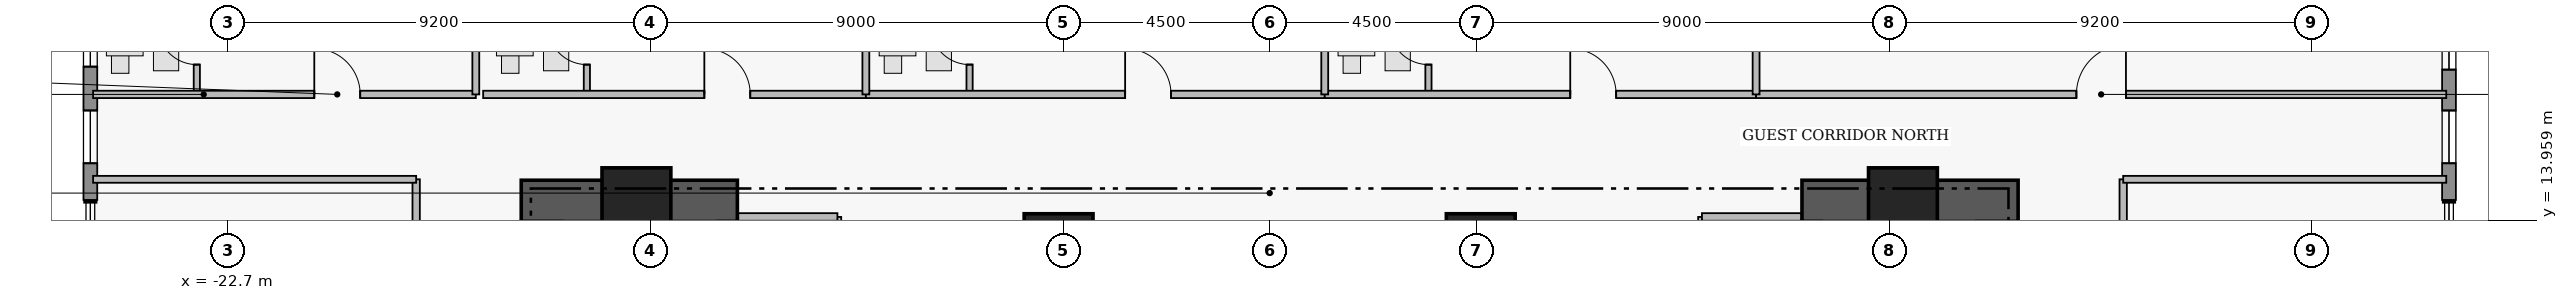
"""IFC4 building model, lengths in metres.
Left out: names, types, materials, properties, quantities, classifications, styles, units other than length and angle.
Written with IfcOpenShell. Run it as: python <this file> out.ifc"""

import sys

from ifc_helpers import new_model, si_unit, direction, frame, frame_2d, origin, origin_2d, place, context, subcontext, project, spatial, rectangle, extrude, element, fill, save


model = new_model("IFC4")
c1 = context("Model", 3, precision=1e-05, world=origin(), true_north=direction((0.0, 1.0)))
c2 = subcontext(c1, "Body", "Model", "MODEL_VIEW")
j1 = project(units=[si_unit("LENGTHUNIT", "METRE"), si_unit("PLANEANGLEUNIT", "RADIAN")], contexts=[c1])
p1 = place(None, origin())
s1 = spatial("IfcSite", under=j1, at=p1, CompositionType="ELEMENT")
p2 = place(p1, origin())
s2 = spatial("IfcBuilding", under=s1, at=p2, CompositionType="ELEMENT")
p3 = place(p2, frame((0.0, 0.0, 38.55)))
s3 = spatial("IfcBuildingStorey", under=s2, at=p3, CompositionType="ELEMENT", Elevation=38.55)
for number, where, z_axis, x_axis in (
    (1, (-16.31, 14.38, 0.0), (0.0, 0.0, 1.0), (1.0, 0.0, 0.0)),
    (2, (11.6, 14.38, 0.0), (0.0, 0.0, 1.0), (1.0, 0.0, 0.0)),
):
    element("IfcWall", number, at=place(p3, frame(where, z_axis=z_axis, x_axis=x_axis)), inside=s3, PredefinedType="SHEAR", context=c2, shape_type="SweptSolid", body=[
        extrude(rectangle(XDim=4.71, YDim=0.9, at=frame_2d((2.355, 0.0))), origin(), (0.0, 0.0, 1.0), 3.46),
    ])
for number, where, z_axis, x_axis in (
    (3, (-13.8, 14.35, 0.0), (0.0, 0.0, 1.0), (1.0, 0.0, 0.0)),
    (4, (-4.6, 13.35, 0.0), (0.0, 0.0, 1.0), (1.0, 0.0, 0.0)),
    (5, (4.6, 13.35, 0.0), (0.0, 0.0, 1.0), (1.0, 0.0, 0.0)),
    (6, (13.8, 14.35, 0.0), (0.0, 0.0, 1.0), (1.0, 0.0, 0.0)),
):
    element("IfcColumn", number, at=place(p3, frame(where, z_axis=z_axis, x_axis=x_axis)), inside=s3, PredefinedType="COLUMN", context=c2, shape_type="SweptSolid", body=[
        extrude(rectangle(XDim=1.5, YDim=1.5, at=origin_2d()), origin(), (0.0, 0.0, 1.0), 3.65),
    ])
p4 = place(p3, frame((-25.7, 14.4, 0.0), z_axis=(0.0, 0.0, 1.0), x_axis=(0.0, 1.0, 0.0)))
e7 = element("IfcWall", 7, at=p4, inside=s3, PredefinedType="STANDARD", context=c2, shape_type="SweptSolid", body=[
    extrude(rectangle(XDim=5.1, YDim=0.3, at=frame_2d((2.55, 0.0))), origin(), (0.0, 0.0, 1.0), 3.43),
])
p5 = place(p4, frame((0.8, 0.0, 0.95)))
e8 = element("IfcOpeningElement", 8, at=p5, cuts=e7, PredefinedType="OPENING", context=c2, shape_type="SweptSolid", body=[
    extrude(rectangle(XDim=1.15, YDim=1.55, at=frame_2d((0.575, 0.775))), frame((0.0, 0.16, 0.0), z_axis=(0.0, -1.0, 0.0), x_axis=(1.0, 0.0, 0.0)), (0.0, 0.0, 1.0), 0.32),
])
p6 = place(p4, frame((2.905, 0.0, 0.95)))
e9 = element("IfcOpeningElement", 9, at=p6, cuts=e7, PredefinedType="OPENING", context=c2, shape_type="SweptSolid", body=[
    extrude(rectangle(XDim=1.15, YDim=1.55, at=frame_2d((0.575, 0.775))), frame((0.0, 0.16, 0.0), z_axis=(0.0, -1.0, 0.0), x_axis=(1.0, 0.0, 0.0)), (0.0, 0.0, 1.0), 0.32),
])
p7 = place(p3, frame((25.7, 19.5, 0.0), z_axis=(0.0, 0.0, 1.0), x_axis=(0.0, -1.0, 0.0)))
e10 = element("IfcWall", 10, at=p7, inside=s3, PredefinedType="STANDARD", context=c2, shape_type="SweptSolid", body=[
    extrude(rectangle(XDim=5.1, YDim=0.3, at=frame_2d((2.55, 0.0))), origin(), (0.0, 0.0, 1.0), 3.43),
])
p8 = place(p7, frame((0.66, 0.0, 0.85)))
e11 = element("IfcOpeningElement", 11, at=p8, cuts=e10, PredefinedType="OPENING", context=c2, shape_type="SweptSolid", body=[
    extrude(rectangle(XDim=1.6, YDim=1.8, at=frame_2d((0.8, 0.9))), frame((0.0, 0.16, 0.0), z_axis=(0.0, -1.0, 0.0), x_axis=(1.0, 0.0, 0.0)), (0.0, 0.0, 1.0), 0.32),
])
p9 = place(p7, frame((3.15, 0.0, 0.95)))
e12 = element("IfcOpeningElement", 12, at=p9, cuts=e10, PredefinedType="OPENING", context=c2, shape_type="SweptSolid", body=[
    extrude(rectangle(XDim=1.15, YDim=1.55, at=frame_2d((0.575, 0.775))), frame((0.0, 0.16, 0.0), z_axis=(0.0, -1.0, 0.0), x_axis=(1.0, 0.0, 0.0)), (0.0, 0.0, 1.0), 0.32),
])
p10 = place(p3, frame((-23.38, 16.7, 0.0), z_axis=(0.0, 0.0, 1.0), x_axis=(0.0, 1.0, 0.0)))
e13 = element("IfcWall", 13, at=p10, inside=s3, PredefinedType="PLUMBINGWALL", context=c2, shape_type="SweptSolid", body=[
    extrude(rectangle(XDim=2.36, YDim=0.135, at=frame_2d((1.18, 0.0))), origin(), (0.0, 0.0, 1.0), 3.43),
])
p11 = place(p10, frame((0.65, 0.0, 0.0)))
e14 = element("IfcOpeningElement", 14, at=p11, cuts=e13, PredefinedType="OPENING", context=c2, shape_type="SweptSolid", body=[
    extrude(rectangle(XDim=0.85, YDim=2.1, at=frame_2d((0.425, 1.05))), frame((0.0, 0.077, 0.0), z_axis=(0.0, -1.0, 0.0), x_axis=(1.0, 0.0, 0.0)), (0.0, 0.0, 1.0), 0.155),
])
p12 = place(p3, frame((-25.64, 16.7, 0.0), z_axis=(0.0, 0.0, 1.0), x_axis=(1.0, 0.0, 0.0)))
e15 = element("IfcWall", 15, at=p12, inside=s3, PredefinedType="PARTITIONING", context=c2, shape_type="SweptSolid", body=[
    extrude(rectangle(XDim=8.34, YDim=0.16, at=frame_2d((4.17, 0.0))), origin(), (0.0, 0.0, 1.0), 3.43),
])
p13 = place(p12, frame((4.82, 0.0, 0.0)))
e16 = element("IfcOpeningElement", 16, at=p13, cuts=e15, PredefinedType="OPENING", context=c2, shape_type="SweptSolid", body=[
    extrude(rectangle(XDim=1.0, YDim=2.15, at=frame_2d((0.5, 1.075))), frame((0.0, 0.09, 0.0), z_axis=(0.0, -1.0, 0.0), x_axis=(1.0, 0.0, 0.0)), (0.0, 0.0, 1.0), 0.18),
])
p14 = place(p3, frame((-14.88, 16.7, 0.0), z_axis=(0.0, 0.0, 1.0), x_axis=(0.0, 1.0, 0.0)))
e17 = element("IfcWall", 17, at=p14, inside=s3, PredefinedType="PLUMBINGWALL", context=c2, shape_type="SweptSolid", body=[
    extrude(rectangle(XDim=2.36, YDim=0.135, at=frame_2d((1.18, 0.0))), origin(), (0.0, 0.0, 1.0), 3.43),
])
p15 = place(p14, frame((0.65, 0.0, 0.0)))
e18 = element("IfcOpeningElement", 18, at=p15, cuts=e17, PredefinedType="OPENING", context=c2, shape_type="SweptSolid", body=[
    extrude(rectangle(XDim=0.85, YDim=2.1, at=frame_2d((0.425, 1.05))), frame((0.0, 0.077, 0.0), z_axis=(0.0, -1.0, 0.0), x_axis=(1.0, 0.0, 0.0)), (0.0, 0.0, 1.0), 0.155),
])
p16 = place(p3, frame((-17.14, 16.7, 0.0), z_axis=(0.0, 0.0, 1.0), x_axis=(1.0, 0.0, 0.0)))
e19 = element("IfcWall", 19, at=p16, inside=s3, PredefinedType="PARTITIONING", context=c2, shape_type="SweptSolid", body=[
    extrude(rectangle(XDim=8.34, YDim=0.16, at=frame_2d((4.17, 0.0))), origin(), (0.0, 0.0, 1.0), 2.973),
])
p17 = place(p16, frame((4.82, 0.0, 0.0)))
e20 = element("IfcOpeningElement", 20, at=p17, cuts=e19, PredefinedType="OPENING", context=c2, shape_type="SweptSolid", body=[
    extrude(rectangle(XDim=1.0, YDim=2.15, at=frame_2d((0.5, 1.075))), frame((0.0, 0.09, 0.0), z_axis=(0.0, -1.0, 0.0), x_axis=(1.0, 0.0, 0.0)), (0.0, 0.0, 1.0), 0.18),
])
p18 = place(p3, frame((-6.54, 16.7, 0.0), z_axis=(0.0, 0.0, 1.0), x_axis=(0.0, 1.0, 0.0)))
e21 = element("IfcWall", 21, at=p18, inside=s3, PredefinedType="PLUMBINGWALL", context=c2, shape_type="SweptSolid", body=[
    extrude(rectangle(XDim=2.36, YDim=0.135, at=frame_2d((1.18, 0.0))), origin(), (0.0, 0.0, 1.0), 3.43),
])
p19 = place(p18, frame((0.65, 0.0, 0.0)))
e22 = element("IfcOpeningElement", 22, at=p19, cuts=e21, PredefinedType="OPENING", context=c2, shape_type="SweptSolid", body=[
    extrude(rectangle(XDim=0.85, YDim=2.1, at=frame_2d((0.425, 1.05))), frame((0.0, 0.077, 0.0), z_axis=(0.0, -1.0, 0.0), x_axis=(1.0, 0.0, 0.0)), (0.0, 0.0, 1.0), 0.155),
])
p20 = place(p3, frame((-8.8, 16.7, 0.0), z_axis=(0.0, 0.0, 1.0), x_axis=(1.0, 0.0, 0.0)))
e23 = element("IfcWall", 23, at=p20, inside=s3, PredefinedType="PARTITIONING", context=c2, shape_type="SweptSolid", body=[
    extrude(rectangle(XDim=10.0, YDim=0.16, at=frame_2d((5.0, 0.0))), origin(), (0.0, 0.0, 1.0), 2.973),
])
p21 = place(p20, frame((5.65, 0.0, 0.0)))
e24 = element("IfcOpeningElement", 24, at=p21, cuts=e23, PredefinedType="OPENING", context=c2, shape_type="SweptSolid", body=[
    extrude(rectangle(XDim=1.0, YDim=2.15, at=frame_2d((0.5, 1.075))), frame((0.0, 0.09, 0.0), z_axis=(0.0, -1.0, 0.0), x_axis=(1.0, 0.0, 0.0)), (0.0, 0.0, 1.0), 0.18),
])
p22 = place(p3, frame((3.46, 16.7, 0.0), z_axis=(0.0, 0.0, 1.0), x_axis=(0.0, 1.0, 0.0)))
e25 = element("IfcWall", 25, at=p22, inside=s3, PredefinedType="PLUMBINGWALL", context=c2, shape_type="SweptSolid", body=[
    extrude(rectangle(XDim=2.36, YDim=0.135, at=frame_2d((1.18, 0.0))), origin(), (0.0, 0.0, 1.0), 3.43),
])
p23 = place(p22, frame((0.65, 0.0, 0.0)))
e26 = element("IfcOpeningElement", 26, at=p23, cuts=e25, PredefinedType="OPENING", context=c2, shape_type="SweptSolid", body=[
    extrude(rectangle(XDim=0.85, YDim=2.1, at=frame_2d((0.425, 1.05))), frame((0.0, 0.077, 0.0), z_axis=(0.0, -1.0, 0.0), x_axis=(1.0, 0.0, 0.0)), (0.0, 0.0, 1.0), 0.155),
])
p24 = place(p3, frame((1.2, 16.7, 0.0), z_axis=(0.0, 0.0, 1.0), x_axis=(1.0, 0.0, 0.0)))
e27 = element("IfcWall", 27, at=p24, inside=s3, PredefinedType="PARTITIONING", context=c2, shape_type="SweptSolid", body=[
    extrude(rectangle(XDim=9.4, YDim=0.16, at=frame_2d((4.7, 0.0))), origin(), (0.0, 0.0, 1.0), 2.973),
])
p25 = place(p24, frame((5.35, 0.0, 0.0)))
e28 = element("IfcOpeningElement", 28, at=p25, cuts=e27, PredefinedType="OPENING", context=c2, shape_type="SweptSolid", body=[
    extrude(rectangle(XDim=1.0, YDim=2.15, at=frame_2d((0.5, 1.075))), frame((0.0, 0.09, 0.0), z_axis=(0.0, -1.0, 0.0), x_axis=(1.0, 0.0, 0.0)), (0.0, 0.0, 1.0), 0.18),
])
p26 = place(p3, frame((10.6, 16.7, 0.0), z_axis=(0.0, 0.0, 1.0), x_axis=(1.0, 0.0, 0.0)))
e29 = element("IfcWall", 29, at=p26, inside=s3, PredefinedType="PARTITIONING", context=c2, shape_type="SweptSolid", body=[
    extrude(rectangle(XDim=15.04, YDim=0.16, at=frame_2d((7.52, 0.0))), origin(), (0.0, 0.0, 1.0), 2.973),
])
p27 = place(p26, frame((6.98, 0.0, 0.0)))
e30 = element("IfcOpeningElement", 30, at=p27, cuts=e29, PredefinedType="OPENING", context=c2, shape_type="SweptSolid", body=[
    extrude(rectangle(XDim=1.08, YDim=2.18, at=frame_2d((0.54, 1.09))), frame((0.0, 0.09, 0.0), z_axis=(0.0, -1.0, 0.0), x_axis=(1.0, 0.0, 0.0)), (0.0, 0.0, 1.0), 0.18),
])
p28 = place(p3, frame((18.6, 6.91, 0.0), z_axis=(0.0, 0.0, 1.0), x_axis=(0.0, 1.0, 0.0)))
e31 = element("IfcWall", 31, at=p28, inside=s3, PredefinedType="PARTITIONING", context=c2, shape_type="SweptSolid", body=[
    extrude(rectangle(XDim=7.94, YDim=0.16, at=frame_2d((3.97, 0.0))), origin(), (0.0, 0.0, 1.0), 3.43),
])
p29 = place(p28, frame((3.51, 0.0, 0.0)))
e32 = element("IfcOpeningElement", 32, at=p29, cuts=e31, PredefinedType="OPENING", context=c2, shape_type="SweptSolid", body=[
    extrude(rectangle(XDim=0.92, YDim=2.12, at=frame_2d((0.46, 1.06))), frame((0.0, 0.09, 0.0), z_axis=(0.0, -1.0, 0.0), x_axis=(1.0, 0.0, 0.0)), (0.0, 0.0, 1.0), 0.18),
])
p30 = place(p3, frame((-18.6, 10.18, 0.0), z_axis=(0.0, 0.0, 1.0), x_axis=(0.0, 1.0, 0.0)))
e33 = element("IfcWall", 33, at=p30, inside=s3, PredefinedType="PARTITIONING", context=c2, shape_type="SweptSolid", body=[
    extrude(rectangle(XDim=4.67, YDim=0.16, at=frame_2d((2.335, 0.0))), origin(), (0.0, 0.0, 1.0), 3.43),
])
p31 = place(p30, frame((1.86, 0.0, 0.0)))
e34 = element("IfcOpeningElement", 34, at=p31, cuts=e33, PredefinedType="OPENING", context=c2, shape_type="SweptSolid", body=[
    extrude(rectangle(XDim=0.95, YDim=2.15, at=frame_2d((0.475, 1.075))), frame((0.0, 0.09, 0.0), z_axis=(0.0, -1.0, 0.0), x_axis=(1.0, 0.0, 0.0)), (0.0, 0.0, 1.0), 0.18),
])
p32 = place(p3, frame((-9.42, 11.07, 0.0), z_axis=(0.0, 0.0, 1.0), x_axis=(0.0, 1.0, 0.0)))
e35 = element("IfcWall", 35, at=p32, inside=s3, PredefinedType="PARTITIONING", context=c2, shape_type="SweptSolid", body=[
    extrude(rectangle(XDim=2.96, YDim=0.165, at=frame_2d((1.48, 0.0))), origin(), (0.0, 0.0, 1.0), 3.43),
])
p33 = place(p3, frame((-11.58, 14.03, 0.0), z_axis=(0.0, 0.0, 1.0), x_axis=(1.0, 0.0, 0.0)))
e36 = element("IfcWall", 36, at=p33, inside=s3, PredefinedType="PARTITIONING", context=c2, shape_type="SweptSolid", body=[
    extrude(rectangle(XDim=2.16, YDim=0.165, at=frame_2d((1.08, 0.0))), origin(), (0.0, 0.0, 1.0), 3.43),
])
p34 = place(p3, frame((9.42, 11.07, 0.0), z_axis=(0.0, 0.0, 1.0), x_axis=(0.0, 1.0, 0.0)))
e37 = element("IfcWall", 37, at=p34, inside=s3, PredefinedType="PARTITIONING", context=c2, shape_type="SweptSolid", body=[
    extrude(rectangle(XDim=2.96, YDim=0.165, at=frame_2d((1.48, 0.0))), origin(), (0.0, 0.0, 1.0), 3.43),
])
p35 = place(p3, frame((9.42, 14.03, 0.0), z_axis=(0.0, 0.0, 1.0), x_axis=(1.0, 0.0, 0.0)))
e38 = element("IfcWall", 38, at=p35, inside=s3, PredefinedType="PARTITIONING", context=c2, shape_type="SweptSolid", body=[
    extrude(rectangle(XDim=2.16, YDim=0.165, at=frame_2d((1.08, 0.0))), origin(), (0.0, 0.0, 1.0), 3.43),
])
for number, where, z_axis, x_axis in (
    (39, (-17.3, 16.7, 0.0), (0.0, 0.0, 1.0), (0.0, 1.0, 0.0)),
    (40, (-8.8, 16.7, 0.0), (0.0, 0.0, 1.0), (0.0, 1.0, 0.0)),
    (41, (1.2, 16.7, 0.0), (0.0, 0.0, 1.0), (0.0, 1.0, 0.0)),
    (42, (10.6, 16.7, 0.0), (0.0, 0.0, 1.0), (0.0, 1.0, 0.0)),
):
    element("IfcWall", number, at=place(p3, frame(where, z_axis=z_axis, x_axis=x_axis)), inside=s3, PredefinedType="PARTITIONING", context=c2, shape_type="SweptSolid", body=[
        extrude(rectangle(XDim=6.32, YDim=0.15, at=frame_2d((3.16, 0.0))), origin(), (0.0, 0.0, 1.0), 3.43),
    ])
for number, where, z_axis, x_axis in (
    (43, (18.6, 14.85, 0.0), (0.0, 0.0, 1.0), (1.0, 0.0, 0.0)),
    (44, (-25.64, 14.85, 0.0), (0.0, 0.0, 1.0), (1.0, 0.0, 0.0)),
):
    element("IfcWall", number, at=place(p3, frame(where, z_axis=z_axis, x_axis=x_axis)), inside=s3, PredefinedType="PARTITIONING", context=c2, shape_type="SweptSolid", body=[
        extrude(rectangle(XDim=7.04, YDim=0.15, at=frame_2d((3.52, 0.0))), origin(), (0.0, 0.0, 1.0), 3.43),
    ])
p36 = place(p5, origin())
e45 = element("IfcWindow", 45, at=p36, inside=s3, PartitioningType="SINGLE_PANEL", PredefinedType="WINDOW", context=c2, shape_type="SweptSolid", body=[
    extrude(rectangle(XDim=1.15, YDim=1.55, at=frame_2d((0.575, 0.775))), frame((0.0, 0.03, 0.0), z_axis=(0.0, -1.0, 0.0), x_axis=(1.0, 0.0, 0.0)), (0.0, 0.0, 1.0), 0.06),
])
fill(e8, e45)
p37 = place(p6, origin())
e46 = element("IfcWindow", 46, at=p37, inside=s3, PartitioningType="SINGLE_PANEL", PredefinedType="WINDOW", context=c2, shape_type="SweptSolid", body=[
    extrude(rectangle(XDim=1.15, YDim=1.55, at=frame_2d((0.575, 0.775))), frame((0.0, 0.03, 0.0), z_axis=(0.0, -1.0, 0.0), x_axis=(1.0, 0.0, 0.0)), (0.0, 0.0, 1.0), 0.06),
])
fill(e9, e46)
p38 = place(p8, origin())
e47 = element("IfcWindow", 47, at=p38, inside=s3, PartitioningType="SINGLE_PANEL", PredefinedType="WINDOW", context=c2, shape_type="SweptSolid", body=[
    extrude(rectangle(XDim=1.6, YDim=1.8, at=frame_2d((0.8, 0.9))), frame((0.0, 0.03, 0.0), z_axis=(0.0, -1.0, 0.0), x_axis=(1.0, 0.0, 0.0)), (0.0, 0.0, 1.0), 0.06),
])
fill(e11, e47)
p39 = place(p9, origin())
e48 = element("IfcWindow", 48, at=p39, inside=s3, PartitioningType="SINGLE_PANEL", PredefinedType="WINDOW", context=c2, shape_type="SweptSolid", body=[
    extrude(rectangle(XDim=1.15, YDim=1.55, at=frame_2d((0.575, 0.775))), frame((0.0, 0.03, 0.0), z_axis=(0.0, -1.0, 0.0), x_axis=(1.0, 0.0, 0.0)), (0.0, 0.0, 1.0), 0.06),
])
fill(e12, e48)
p40 = place(p11, origin())
e49 = element("IfcDoor", 49, at=p40, inside=s3, OperationType="SINGLE_SWING_RIGHT", PredefinedType="DOOR", context=c2, shape_type="SweptSolid", body=[
    extrude(rectangle(XDim=0.85, YDim=2.1, at=frame_2d((0.425, 1.05))), frame((0.0, 0.025, 0.0), z_axis=(0.0, -1.0, 0.0), x_axis=(1.0, 0.0, 0.0)), (0.0, 0.0, 1.0), 0.05),
])
fill(e14, e49)
p41 = place(p13, origin())
e50 = element("IfcDoor", 50, at=p41, inside=s3, OperationType="SINGLE_SWING_LEFT", PredefinedType="DOOR", context=c2, shape_type="SweptSolid", body=[
    extrude(rectangle(XDim=1.0, YDim=2.15, at=frame_2d((0.5, 1.075))), frame((0.0, 0.025, 0.0), z_axis=(0.0, -1.0, 0.0), x_axis=(1.0, 0.0, 0.0)), (0.0, 0.0, 1.0), 0.05),
])
fill(e16, e50)
p42 = place(p15, origin())
e51 = element("IfcDoor", 51, at=p42, inside=s3, OperationType="SINGLE_SWING_RIGHT", PredefinedType="DOOR", context=c2, shape_type="SweptSolid", body=[
    extrude(rectangle(XDim=0.85, YDim=2.1, at=frame_2d((0.425, 1.05))), frame((0.0, 0.025, 0.0), z_axis=(0.0, -1.0, 0.0), x_axis=(1.0, 0.0, 0.0)), (0.0, 0.0, 1.0), 0.05),
])
fill(e18, e51)
p43 = place(p17, origin())
e52 = element("IfcDoor", 52, at=p43, inside=s3, OperationType="SINGLE_SWING_LEFT", PredefinedType="DOOR", context=c2, shape_type="SweptSolid", body=[
    extrude(rectangle(XDim=1.0, YDim=2.15, at=frame_2d((0.5, 1.075))), frame((0.0, 0.025, 0.0), z_axis=(0.0, -1.0, 0.0), x_axis=(1.0, 0.0, 0.0)), (0.0, 0.0, 1.0), 0.05),
])
fill(e20, e52)
p44 = place(p19, origin())
e53 = element("IfcDoor", 53, at=p44, inside=s3, OperationType="SINGLE_SWING_RIGHT", PredefinedType="DOOR", context=c2, shape_type="SweptSolid", body=[
    extrude(rectangle(XDim=0.85, YDim=2.1, at=frame_2d((0.425, 1.05))), frame((0.0, 0.025, 0.0), z_axis=(0.0, -1.0, 0.0), x_axis=(1.0, 0.0, 0.0)), (0.0, 0.0, 1.0), 0.05),
])
fill(e22, e53)
p45 = place(p21, origin())
e54 = element("IfcDoor", 54, at=p45, inside=s3, OperationType="SINGLE_SWING_LEFT", PredefinedType="DOOR", context=c2, shape_type="SweptSolid", body=[
    extrude(rectangle(XDim=1.0, YDim=2.15, at=frame_2d((0.5, 1.075))), frame((0.0, 0.025, 0.0), z_axis=(0.0, -1.0, 0.0), x_axis=(1.0, 0.0, 0.0)), (0.0, 0.0, 1.0), 0.05),
])
fill(e24, e54)
p46 = place(p23, origin())
e55 = element("IfcDoor", 55, at=p46, inside=s3, OperationType="SINGLE_SWING_RIGHT", PredefinedType="DOOR", context=c2, shape_type="SweptSolid", body=[
    extrude(rectangle(XDim=0.85, YDim=2.1, at=frame_2d((0.425, 1.05))), frame((0.0, 0.025, 0.0), z_axis=(0.0, -1.0, 0.0), x_axis=(1.0, 0.0, 0.0)), (0.0, 0.0, 1.0), 0.05),
])
fill(e26, e55)
p47 = place(p25, origin())
e56 = element("IfcDoor", 56, at=p47, inside=s3, OperationType="SINGLE_SWING_LEFT", PredefinedType="DOOR", context=c2, shape_type="SweptSolid", body=[
    extrude(rectangle(XDim=1.0, YDim=2.15, at=frame_2d((0.5, 1.075))), frame((0.0, 0.025, 0.0), z_axis=(0.0, -1.0, 0.0), x_axis=(1.0, 0.0, 0.0)), (0.0, 0.0, 1.0), 0.05),
])
fill(e28, e56)
p48 = place(p27, origin())
e57 = element("IfcDoor", 57, at=p48, inside=s3, OperationType="SINGLE_SWING_RIGHT", PredefinedType="DOOR", context=c2, shape_type="SweptSolid", body=[
    extrude(rectangle(XDim=1.08, YDim=2.18, at=frame_2d((0.54, 1.09))), frame((0.0, 0.025, 0.0), z_axis=(0.0, -1.0, 0.0), x_axis=(1.0, 0.0, 0.0)), (0.0, 0.0, 1.0), 0.05),
])
fill(e30, e57)
save(model, sys.argv[1])
